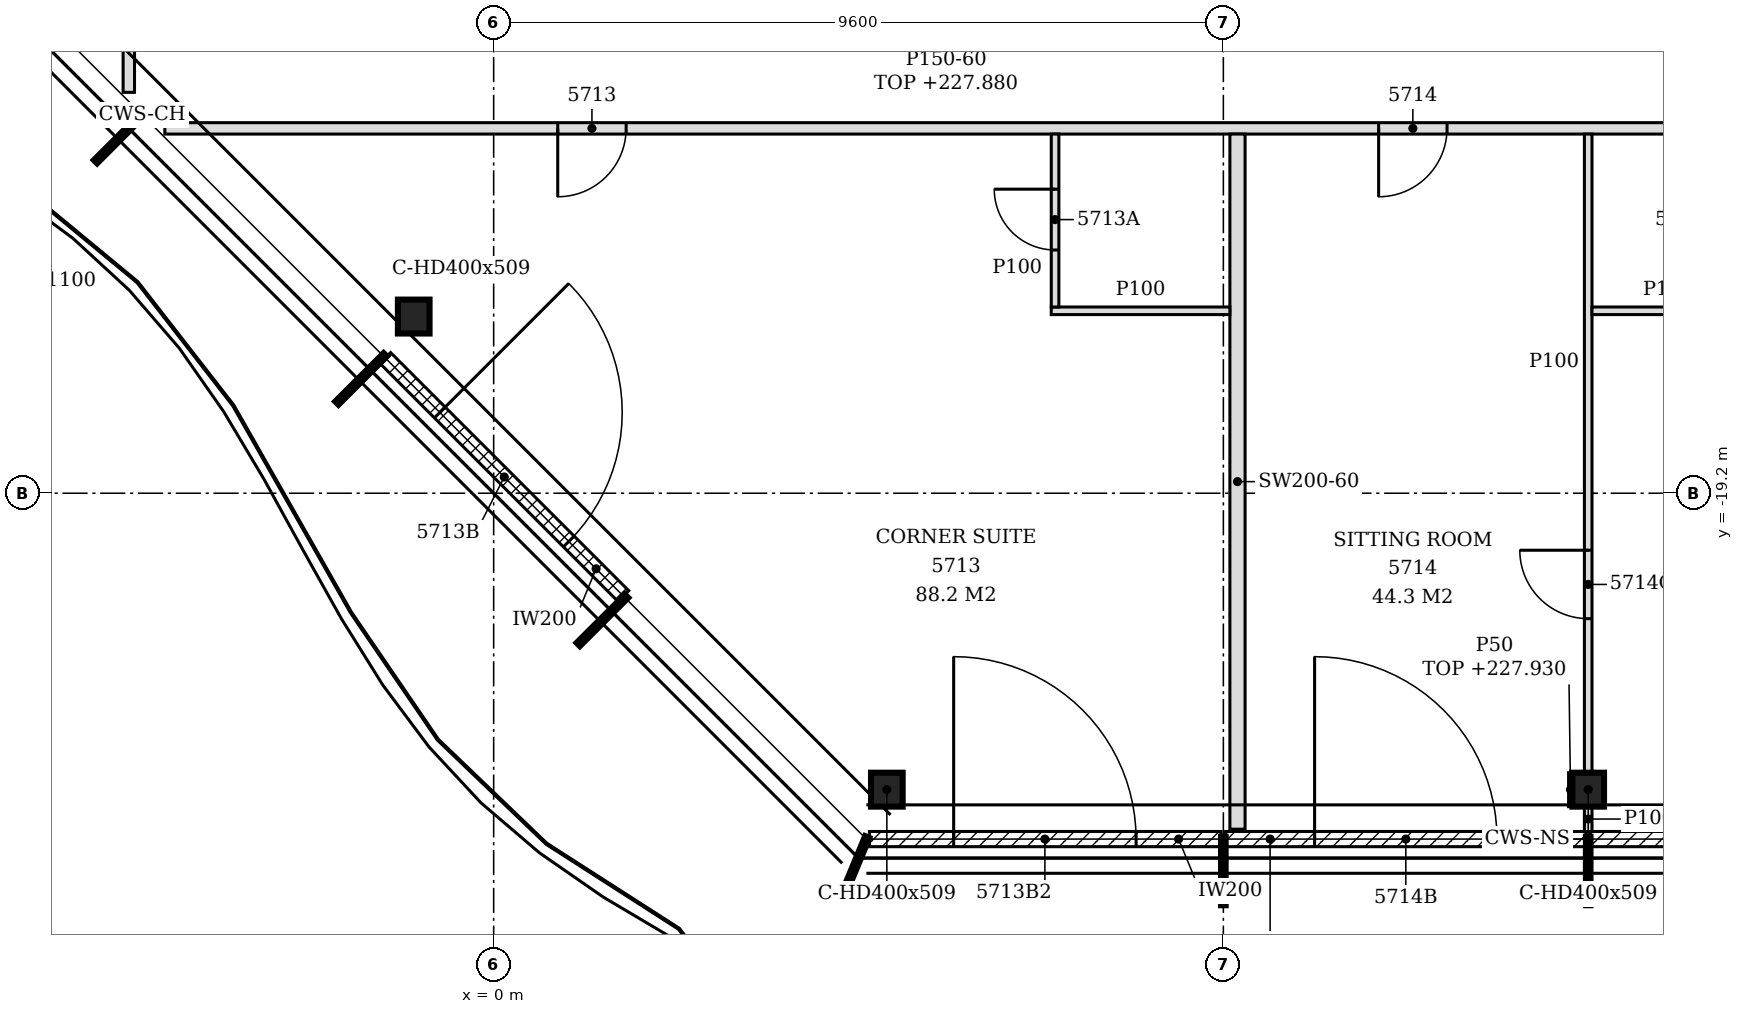
"""IFC4 building model, lengths in metres.
Left out: names, types, materials, properties, quantities, classifications, styles, units other than length and angle.
Written with IfcOpenShell. Run it as: python <this file> out.ifc"""

import sys

from ifc_helpers import new_model, si_unit, direction, frame, frame_2d, origin, origin_2d, place, context, subcontext, project, spatial, polyline, rectangle, i_section, outline, extrude, element, fill, save


model = new_model("IFC4")
c1 = context("Model", 3, precision=1e-05, world=origin(), true_north=direction((0.0, 1.0)))
c2 = subcontext(c1, "Body", "Model", "MODEL_VIEW")
j1 = project(units=[si_unit("LENGTHUNIT", "METRE"), si_unit("PLANEANGLEUNIT", "RADIAN")], contexts=[c1])
p1 = place(None, origin())
s1 = spatial("IfcSite", under=j1, at=p1, CompositionType="ELEMENT")
p2 = place(p1, origin())
s2 = spatial("IfcBuilding", under=s1, at=p2, CompositionType="ELEMENT")
p3 = place(p2, frame((0.0, 0.0, 225.0)))
s3 = spatial("IfcBuildingStorey", under=s2, at=p3, CompositionType="ELEMENT", Elevation=225.0)
for number, where, z_axis, x_axis in (
    (1, (5.173, -23.1, -0.15), (0.0, 0.0, 1.0), (1.0, 0.0, 0.0)),
    (2, (14.4, -23.1, -0.15), (0.0, 0.0, 1.0), (1.0, 0.0, 0.0)),
    (3, (-1.052, -16.876, -0.15), (0.0, 0.0, 1.0), (1.0, 0.0, 0.0)),
):
    element("IfcColumn", number, at=place(p3, frame(where, z_axis=z_axis, x_axis=x_axis)), inside=s3, PredefinedType="COLUMN", context=c2, shape_type="SweptSolid", body=[
        extrude(i_section(OverallWidth=0.416, OverallDepth=0.446, WebThickness=0.039, FlangeThickness=0.063, FilletRadius=0.015, at=origin_2d()), origin(), (0.0, 0.0, 1.0), 3.6),
    ])
p4 = place(p3, frame((4.944, -23.75, 0.0), z_axis=(0.0, 0.0, 1.0), x_axis=(1.0, 0.0, 0.0)))
e4 = element("IfcWall", 4, at=p4, inside=s3, PredefinedType="NOTDEFINED", context=c2, shape_type="SweptSolid", body=[
    extrude(rectangle(XDim=4.626, YDim=0.2, at=frame_2d((2.313, 0.0))), origin(), (0.0, 0.0, 1.0), 3.45),
])
p5 = place(p4, frame((1.108, 0.0, 0.0)))
e5 = element("IfcOpeningElement", 5, at=p5, cuts=e4, PredefinedType="OPENING", context=c2, shape_type="SweptSolid", body=[
    extrude(rectangle(XDim=2.4, YDim=2.4, at=frame_2d((1.2, 1.2))), frame((0.0, 0.11, 0.0), z_axis=(0.0, -1.0, 0.0), x_axis=(1.0, 0.0, 0.0)), (0.0, 0.0, 1.0), 0.22),
])
p6 = place(p3, frame((9.63, -23.75, 0.0), z_axis=(0.0, 0.0, 1.0), x_axis=(1.0, 0.0, 0.0)))
e6 = element("IfcWall", 6, at=p6, inside=s3, PredefinedType="NOTDEFINED", context=c2, shape_type="SweptSolid", body=[
    extrude(rectangle(XDim=4.74, YDim=0.2, at=frame_2d((2.37, 0.0))), origin(), (0.0, 0.0, 1.0), 3.45),
])
p7 = place(p6, frame((1.17, 0.0, 0.0)))
e7 = element("IfcOpeningElement", 7, at=p7, cuts=e6, PredefinedType="OPENING", context=c2, shape_type="SweptSolid", body=[
    extrude(rectangle(XDim=2.4, YDim=2.4, at=frame_2d((1.2, 1.2))), frame((0.0, 0.11, 0.0), z_axis=(0.0, -1.0, 0.0), x_axis=(1.0, 0.0, 0.0)), (0.0, 0.0, 1.0), 0.22),
])
p8 = place(p3, frame((14.43, -23.75, 0.0), z_axis=(0.0, 0.0, 1.0), x_axis=(1.0, 0.0, 0.0)))
e8 = element("IfcWall", 8, at=p8, inside=s3, PredefinedType="NOTDEFINED", context=c2, shape_type="SweptSolid", body=[
    extrude(rectangle(XDim=4.74, YDim=0.2, at=frame_2d((2.37, 0.0))), origin(), (0.0, 0.0, 1.0), 3.45),
])
p9 = place(p8, frame((1.17, 0.0, 0.0)))
e9 = element("IfcOpeningElement", 9, at=p9, cuts=e8, PredefinedType="OPENING", context=c2, shape_type="SweptSolid", body=[
    extrude(rectangle(XDim=2.4, YDim=2.4, at=frame_2d((1.2, 1.2))), frame((0.0, 0.11, 0.0), z_axis=(0.0, -1.0, 0.0), x_axis=(1.0, 0.0, 0.0)), (0.0, 0.0, 1.0), 0.22),
])
p10 = place(p3, frame((-1.427, -17.42, 0.0), z_axis=(0.0, 0.0, 1.0), x_axis=(0.707106781187, -0.707106781187, 0.0)))
e10 = element("IfcWall", 10, at=p10, inside=s3, PredefinedType="NOTDEFINED", context=c2, shape_type="SweptSolid", body=[
    extrude(rectangle(XDim=4.431, YDim=0.2, at=frame_2d((2.216, 0.0))), origin(), (0.0, 0.0, 1.0), 3.45),
])
p11 = place(p10, frame((1.015, 0.0, 0.0)))
e11 = element("IfcOpeningElement", 11, at=p11, cuts=e10, PredefinedType="OPENING", context=c2, shape_type="SweptSolid", body=[
    extrude(rectangle(XDim=2.4, YDim=2.4, at=frame_2d((1.2, 1.2))), frame((0.0, 0.11, 0.0), z_axis=(0.0, -1.0, 0.0), x_axis=(1.0, 0.0, 0.0)), (0.0, 0.0, 1.0), 0.22),
])
p12 = place(p3, frame((14.4, -23.65, 0.0), z_axis=(0.0, 0.0, 1.0), x_axis=(0.0, 1.0, 0.0)))
e12 = element("IfcWall", 12, at=p12, inside=s3, PredefinedType="PARTITIONING", context=c2, shape_type="SweptSolid", body=[
    extrude(rectangle(XDim=0.327, YDim=0.1, at=frame_2d((0.164, 0.0))), origin(), (0.0, 0.0, 1.0), 3.45),
])
p13 = place(p3, frame((9.786, -23.62, 0.0), z_axis=(0.0, 0.0, 1.0), x_axis=(0.0, 1.0, 0.0)))
e13 = element("IfcWall", 13, at=p13, inside=s3, PredefinedType="PARTITIONING", context=c2, shape_type="SweptSolid", body=[
    extrude(outline(polyline([(0.0, 0.0), (9.145, 0.0), (9.145, 2.88), (9.115, 2.88), (9.113, 3.45), (4.525, 3.45), (4.523, 2.88), (4.315, 2.88), (4.313, 3.45), (0.67, 3.45), (0.668, 2.93), (0.37, 2.93), (0.368, 3.45), (0.0, 3.45), (0.0, 0.0)])), frame((0.0, 0.1, 0.0), z_axis=(0.0, -1.0, 0.0), x_axis=(1.0, 0.0, 0.0)), (0.0, 0.0, 1.0), 0.2),
])
p14 = place(p3, frame((14.4, -22.877, 0.0), z_axis=(0.0, 0.0, 1.0), x_axis=(0.0, 1.0, 0.0)))
e14 = element("IfcWall", 14, at=p14, inside=s3, PredefinedType="PARTITIONING", context=c2, shape_type="SweptSolid", body=[
    extrude(outline(polyline([(0.0, 0.0), (8.402, 0.0), (8.402, 2.88), (8.372, 2.88), (8.37, 3.45), (3.782, 3.45), (3.78, 2.88), (3.572, 2.88), (3.57, 3.45), (0.0, 3.45), (0.0, 0.0)])), frame((0.0, 0.05, 0.0), z_axis=(0.0, -1.0, 0.0), x_axis=(1.0, 0.0, 0.0)), (0.0, 0.0, 1.0), 0.1),
])
p15 = place(p14, frame((2.027, 0.0, 0.0)))
e15 = element("IfcOpeningElement", 15, at=p15, cuts=e14, PredefinedType="OPENING", context=c2, shape_type="SweptSolid", body=[
    extrude(rectangle(XDim=0.9, YDim=2.1, at=frame_2d((0.45, 1.05))), frame((0.0, 0.06, 0.0), z_axis=(0.0, -1.0, 0.0), x_axis=(1.0, 0.0, 0.0)), (0.0, 0.0, 1.0), 0.12),
])
p16 = place(p3, frame((7.336, -16.8, 0.0), z_axis=(0.0, 0.0, 1.0), x_axis=(1.0, 0.0, 0.0)))
e16 = element("IfcWall", 16, at=p16, inside=s3, PredefinedType="PARTITIONING", context=c2, shape_type="SweptSolid", body=[
    extrude(outline(polyline([(0.0, 0.0), (2.35, 0.0), (2.35, 3.45), (0.014, 3.45), (0.012, 2.73), (0.0, 2.73), (0.0, 0.0)])), frame((0.0, 0.05, 0.0), z_axis=(0.0, -1.0, 0.0), x_axis=(1.0, 0.0, 0.0)), (0.0, 0.0, 1.0), 0.1),
])
p17 = place(p3, frame((7.386, -16.75, 0.0), z_axis=(0.0, 0.0, 1.0), x_axis=(0.0, 1.0, 0.0)))
e17 = element("IfcWall", 17, at=p17, inside=s3, PredefinedType="PARTITIONING", context=c2, shape_type="SweptSolid", body=[
    extrude(outline(polyline([(0.0, 0.0), (2.275, 0.0), (2.275, 2.88), (2.245, 2.88), (2.243, 3.45), (0.0, 3.45), (0.0, 0.0)])), frame((0.0, 0.05, 0.0), z_axis=(0.0, -1.0, 0.0), x_axis=(1.0, 0.0, 0.0)), (0.0, 0.0, 1.0), 0.1),
])
p18 = place(p17, frame((0.75, 0.0, 0.0)))
e18 = element("IfcOpeningElement", 18, at=p18, cuts=e17, PredefinedType="OPENING", context=c2, shape_type="SweptSolid", body=[
    extrude(rectangle(XDim=0.8, YDim=2.1, at=frame_2d((0.4, 1.05))), frame((0.0, 0.06, 0.0), z_axis=(0.0, -1.0, 0.0), x_axis=(1.0, 0.0, 0.0)), (0.0, 0.0, 1.0), 0.12),
])
p19 = place(p3, frame((14.45, -16.8, 0.0), z_axis=(0.0, 0.0, 1.0), x_axis=(1.0, 0.0, 0.0)))
e19 = element("IfcWall", 19, at=p19, inside=s3, PredefinedType="PARTITIONING", context=c2, shape_type="SweptSolid", body=[
    extrude(rectangle(XDim=2.0, YDim=0.1, at=frame_2d((1.0, 0.0))), origin(), (0.0, 0.0, 1.0), 3.45),
])
p20 = place(p3, frame((-4.326, -14.4, 0.0), z_axis=(0.0, 0.0, 1.0), x_axis=(1.0, 0.0, 0.0)))
e20 = element("IfcWall", 20, at=p20, inside=s3, PredefinedType="PARTITIONING", context=c2, shape_type="SweptSolid", body=[
    extrude(outline(polyline([(0.0, 0.0), (21.026, 0.0), (21.026, 2.88), (11.676, 2.88), (11.674, 2.73), (11.376, 2.73), (11.374, 2.88), (1.369, 2.88), (1.367, 2.63), (0.229, 2.63), (0.227, 2.88), (0.0, 2.88), (0.0, 0.0)])), frame((0.0, 0.075, 0.0), z_axis=(0.0, -1.0, 0.0), x_axis=(1.0, 0.0, 0.0)), (0.0, 0.0, 1.0), 0.15),
])
p21 = place(p20, frame((5.169, 0.0, 0.0)))
e21 = element("IfcOpeningElement", 21, at=p21, cuts=e20, PredefinedType="OPENING", context=c2, shape_type="SweptSolid", body=[
    extrude(rectangle(XDim=0.9, YDim=2.1, at=frame_2d((0.45, 1.05))), frame((0.0, 0.085, 0.0), z_axis=(0.0, -1.0, 0.0), x_axis=(1.0, 0.0, 0.0)), (0.0, 0.0, 1.0), 0.17),
])
p22 = place(p20, frame((15.969, 0.0, 0.0)))
e22 = element("IfcOpeningElement", 22, at=p22, cuts=e20, PredefinedType="OPENING", context=c2, shape_type="SweptSolid", body=[
    extrude(rectangle(XDim=0.9, YDim=2.1, at=frame_2d((0.45, 1.05))), frame((0.0, 0.085, 0.0), z_axis=(0.0, -1.0, 0.0), x_axis=(1.0, 0.0, 0.0)), (0.0, 0.0, 1.0), 0.17),
])
p23 = place(p3, frame((-4.8, -13.926, 0.0), z_axis=(0.0, 0.0, 1.0), x_axis=(0.0, 1.0, 0.0)))
e23 = element("IfcWall", 23, at=p23, inside=s3, PredefinedType="PARTITIONING", context=c2, shape_type="SweptSolid", body=[
    extrude(outline(polyline([(0.0, 0.0), (2.92, 0.0), (2.92, 3.03), (1.369, 3.03), (1.367, 2.63), (0.229, 2.63), (0.227, 3.03), (0.0, 3.03), (0.0, 0.0)])), frame((0.0, 0.075, 0.0), z_axis=(0.0, -1.0, 0.0), x_axis=(1.0, 0.0, 0.0)), (0.0, 0.0, 1.0), 0.15),
])
p24 = place(p3, frame((14.167, -23.323, 0.0), z_axis=(0.0, 0.0, 1.0), x_axis=(0.0, 1.0, 0.0)))
e24 = element("IfcWall", 24, at=p24, inside=s3, PredefinedType="PARTITIONING", context=c2, shape_type="SweptSolid", body=[
    extrude(rectangle(XDim=0.446, YDim=0.05, at=frame_2d((0.223, 0.0))), origin(), (0.0, 0.0, 1.0), 2.93),
])
p25 = place(p5, origin())
e25 = element("IfcDoor", 25, at=p25, inside=s3, OperationType="SINGLE_SWING_LEFT", PredefinedType="DOOR", context=c2, shape_type="SweptSolid", body=[
    extrude(rectangle(XDim=2.4, YDim=2.4, at=frame_2d((1.2, 1.2))), frame((0.0, 0.025, 0.0), z_axis=(0.0, -1.0, 0.0), x_axis=(1.0, 0.0, 0.0)), (0.0, 0.0, 1.0), 0.05),
])
fill(e5, e25)
p26 = place(p7, origin())
e26 = element("IfcDoor", 26, at=p26, inside=s3, OperationType="SINGLE_SWING_LEFT", PredefinedType="DOOR", context=c2, shape_type="SweptSolid", body=[
    extrude(rectangle(XDim=2.4, YDim=2.4, at=frame_2d((1.2, 1.2))), frame((0.0, 0.025, 0.0), z_axis=(0.0, -1.0, 0.0), x_axis=(1.0, 0.0, 0.0)), (0.0, 0.0, 1.0), 0.05),
])
fill(e7, e26)
p27 = place(p11, origin())
e27 = element("IfcDoor", 27, at=p27, inside=s3, OperationType="SINGLE_SWING_LEFT", PredefinedType="DOOR", context=c2, shape_type="SweptSolid", body=[
    extrude(rectangle(XDim=2.4, YDim=2.4, at=frame_2d((1.2, 1.2))), frame((0.0, 0.025, 0.0), z_axis=(0.0, -1.0, 0.0), x_axis=(1.0, 0.0, 0.0)), (0.0, 0.0, 1.0), 0.05),
])
fill(e11, e27)
p28 = place(p21, frame((0.9, 0.0, 0.0), z_axis=(0.0, 0.0, 1.0), x_axis=(-1.0, 0.0, 0.0)))
e28 = element("IfcDoor", 28, at=p28, inside=s3, OperationType="SINGLE_SWING_RIGHT", PredefinedType="DOOR", context=c2, shape_type="SweptSolid", body=[
    extrude(rectangle(XDim=0.9, YDim=2.1, at=frame_2d((0.45, 1.05))), frame((0.0, 0.025, 0.0), z_axis=(0.0, -1.0, 0.0), x_axis=(1.0, 0.0, 0.0)), (0.0, 0.0, 1.0), 0.05),
])
fill(e21, e28)
p29 = place(p18, origin())
e29 = element("IfcDoor", 29, at=p29, inside=s3, OperationType="SINGLE_SWING_RIGHT", PredefinedType="DOOR", context=c2, shape_type="SweptSolid", body=[
    extrude(rectangle(XDim=0.8, YDim=2.1, at=frame_2d((0.4, 1.05))), frame((0.0, 0.025, 0.0), z_axis=(0.0, -1.0, 0.0), x_axis=(1.0, 0.0, 0.0)), (0.0, 0.0, 1.0), 0.05),
])
fill(e18, e29)
p30 = place(p22, frame((0.9, 0.0, 0.0), z_axis=(0.0, 0.0, 1.0), x_axis=(-1.0, 0.0, 0.0)))
e30 = element("IfcDoor", 30, at=p30, inside=s3, OperationType="SINGLE_SWING_RIGHT", PredefinedType="DOOR", context=c2, shape_type="SweptSolid", body=[
    extrude(rectangle(XDim=0.9, YDim=2.1, at=frame_2d((0.45, 1.05))), frame((0.0, 0.025, 0.0), z_axis=(0.0, -1.0, 0.0), x_axis=(1.0, 0.0, 0.0)), (0.0, 0.0, 1.0), 0.05),
])
fill(e22, e30)
p31 = place(p15, origin())
e31 = element("IfcDoor", 31, at=p31, inside=s3, OperationType="SINGLE_SWING_RIGHT", PredefinedType="DOOR", context=c2, shape_type="SweptSolid", body=[
    extrude(rectangle(XDim=0.9, YDim=2.1, at=frame_2d((0.45, 1.05))), frame((0.0, 0.025, 0.0), z_axis=(0.0, -1.0, 0.0), x_axis=(1.0, 0.0, 0.0)), (0.0, 0.0, 1.0), 0.05),
])
fill(e15, e31)
save(model, sys.argv[1])
